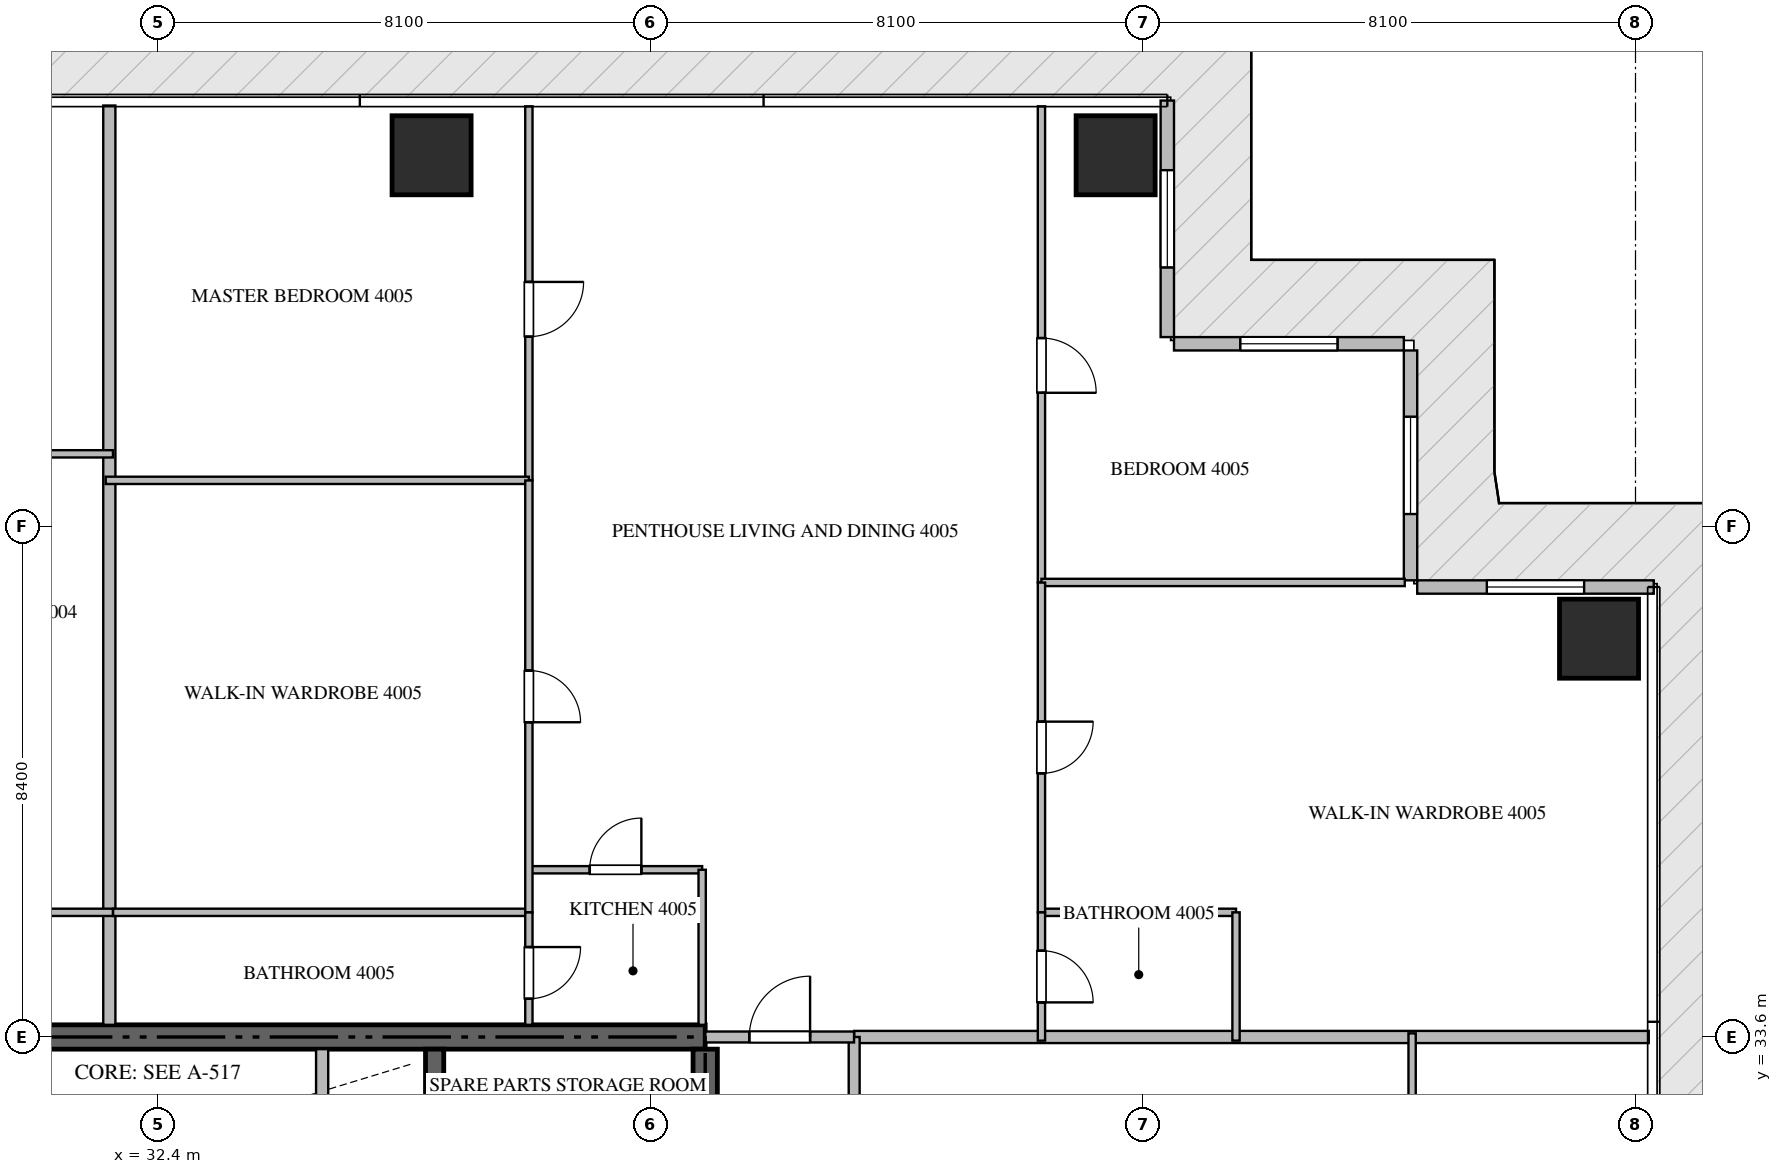
"""IFC4 building model, lengths in metres.
Left out: names, types, materials, properties, quantities, classifications, styles, units other than length and angle.
Written with IfcOpenShell. Run it as: python <this file> out.ifc"""

import sys

from ifc_helpers import new_model, si_unit, direction, frame, frame_2d, origin, origin_2d, place, context, subcontext, project, spatial, rectangle, extrude, source, transform, mapped, element, fill, save


model = new_model("IFC4")
c1 = context("Model", 3, precision=1e-05, world=origin(), true_north=direction((0.0, 1.0)))
c2 = subcontext(c1, "Body", "Model", "MODEL_VIEW")
j1 = project(units=[si_unit("LENGTHUNIT", "METRE"), si_unit("PLANEANGLEUNIT", "RADIAN")], contexts=[c1])
p1 = place(None, origin())
s1 = spatial("IfcSite", under=j1, at=p1, CompositionType="ELEMENT")
p2 = place(p1, origin())
s2 = spatial("IfcBuilding", under=s1, at=p2, CompositionType="ELEMENT")
p3 = place(p2, frame((0.0, 0.0, 161.4)))
s3 = spatial("IfcBuildingStorey", under=s2, at=p3, CompositionType="ELEMENT", Elevation=161.4)
p4 = place(p3, frame((41.4, 33.6, -0.26), z_axis=(0.0, 0.0, 1.0), x_axis=(-1.0, 0.0, 0.0)))
e1 = element("IfcWall", 1, at=p4, inside=s3, PredefinedType="SHEAR", context=c2, shape_type="SweptSolid", body=[
    extrude(rectangle(XDim=18.0, YDim=0.4, at=frame_2d((9.0, 0.0))), origin(), (0.0, 0.0, 1.0), 3.748),
])
p5 = place(p3, frame((41.4, 27.75, -0.26), z_axis=(0.0, 0.0, 1.0), x_axis=(0.0, 1.0, 0.0)))
e2 = element("IfcWall", 2, at=p5, inside=s3, PredefinedType="SHEAR", context=c2, shape_type="SweptSolid", body=[
    extrude(rectangle(XDim=5.65, YDim=0.4, at=frame_2d((2.825, 0.0))), origin(), (0.0, 0.0, 1.0), 3.748),
])
p6 = place(p3, frame((36.95, 27.05, -0.26), z_axis=(0.0, 0.0, 1.0), x_axis=(0.0, 1.0, 0.0)))
e3 = element("IfcWall", 3, at=p6, inside=s3, PredefinedType="SHEAR", context=c2, shape_type="SweptSolid", body=[
    extrude(rectangle(XDim=6.35, YDim=0.3, at=frame_2d((3.175, 0.0))), origin(), (0.0, 0.0, 1.0), 3.748),
])
m1 = source(origin(), c2, "Body", "SweptSolid", [
    extrude(rectangle(XDim=1.3, YDim=1.3, at=origin_2d()), origin(), (0.0, 0.0, 1.0), 3.75),
])
for number, where, z_axis, x_axis in (
    (4, (36.9, 48.1, -0.26), (0.0, 0.0, 1.0), (1.0, 0.0, 0.0)),
    (5, (48.15, 48.1, -0.26), (0.0, 0.0, 1.0), (1.0, 0.0, 0.0)),
    (6, (56.1, 40.15, -0.26), (0.0, 0.0, 1.0), (1.0, 0.0, 0.0)),
):
    element("IfcColumn", number, at=place(p3, frame(where, z_axis=z_axis, x_axis=x_axis)), inside=s3, PredefinedType="COLUMN", context=c2, shape_type="MappedRepresentation", body=[
        mapped(m1, transform((0.0, 0.0, 0.0), scale=1.0)),
    ])
p7 = place(p3, frame((57.0, 41.0, 0.0), z_axis=(0.0, 0.0, 1.0), x_axis=(-1.0, 0.0, 0.0)))
e7 = element("IfcWall", 7, at=p7, inside=s3, PredefinedType="ELEMENTEDWALL", context=c2, shape_type="SweptSolid", body=[
    extrude(rectangle(XDim=3.89, YDim=0.22, at=frame_2d((1.945, 0.0))), origin(), (0.0, 0.0, 1.0), 3.475),
])
p8 = place(p7, frame((1.145, 0.0, 0.65)))
e8 = element("IfcOpeningElement", 8, at=p8, cuts=e7, PredefinedType="OPENING", context=c2, shape_type="SweptSolid", body=[
    extrude(rectangle(XDim=1.6, YDim=2.1, at=frame_2d((0.8, 1.05))), frame((0.0, 0.12, 0.0), z_axis=(0.0, -1.0, 0.0), x_axis=(1.0, 0.0, 0.0)), (0.0, 0.0, 1.0), 0.24),
])
p9 = place(p3, frame((53.0, 41.11, 0.0), z_axis=(0.0, 0.0, 1.0), x_axis=(0.0, 1.0, 0.0)))
e9 = element("IfcWall", 9, at=p9, inside=s3, PredefinedType="ELEMENTEDWALL", context=c2, shape_type="SweptSolid", body=[
    extrude(rectangle(XDim=3.78, YDim=0.22, at=frame_2d((1.89, 0.0))), origin(), (0.0, 0.0, 1.0), 3.475),
])
p10 = place(p9, frame((1.09, 0.0, 0.65)))
e10 = element("IfcOpeningElement", 10, at=p10, cuts=e9, PredefinedType="OPENING", context=c2, shape_type="SweptSolid", body=[
    extrude(rectangle(XDim=1.6, YDim=2.1, at=frame_2d((0.8, 1.05))), frame((0.0, 0.12, 0.0), z_axis=(0.0, -1.0, 0.0), x_axis=(1.0, 0.0, 0.0)), (0.0, 0.0, 1.0), 0.24),
])
p11 = place(p3, frame((52.89, 45.0, 0.0), z_axis=(0.0, 0.0, 1.0), x_axis=(-1.0, 0.0, 0.0)))
e11 = element("IfcWall", 11, at=p11, inside=s3, PredefinedType="ELEMENTEDWALL", context=c2, shape_type="SweptSolid", body=[
    extrude(rectangle(XDim=3.78, YDim=0.22, at=frame_2d((1.89, 0.0))), origin(), (0.0, 0.0, 1.0), 3.475),
])
p12 = place(p11, frame((1.09, 0.0, 0.65)))
e12 = element("IfcOpeningElement", 12, at=p12, cuts=e11, PredefinedType="OPENING", context=c2, shape_type="SweptSolid", body=[
    extrude(rectangle(XDim=1.6, YDim=2.1, at=frame_2d((0.8, 1.05))), frame((0.0, 0.12, 0.0), z_axis=(0.0, -1.0, 0.0), x_axis=(1.0, 0.0, 0.0)), (0.0, 0.0, 1.0), 0.24),
])
p13 = place(p3, frame((49.0, 45.11, 0.0), z_axis=(0.0, 0.0, 1.0), x_axis=(0.0, 1.0, 0.0)))
e13 = element("IfcWall", 13, at=p13, inside=s3, PredefinedType="ELEMENTEDWALL", context=c2, shape_type="SweptSolid", body=[
    extrude(rectangle(XDim=3.89, YDim=0.22, at=frame_2d((1.945, 0.0))), origin(), (0.0, 0.0, 1.0), 3.475),
])
p14 = place(p13, frame((1.145, 0.0, 0.65)))
e14 = element("IfcOpeningElement", 14, at=p14, cuts=e13, PredefinedType="OPENING", context=c2, shape_type="SweptSolid", body=[
    extrude(rectangle(XDim=1.6, YDim=2.1, at=frame_2d((0.8, 1.05))), frame((0.0, 0.12, 0.0), z_axis=(0.0, -1.0, 0.0), x_axis=(1.0, 0.0, 0.0)), (0.0, 0.0, 1.0), 0.24),
])
p15 = place(p3, frame((35.1, 30.75, 0.0), z_axis=(0.0, 0.0, 1.0), x_axis=(0.0, 1.0, 0.0)))
e15 = element("IfcWall", 15, at=p15, inside=s3, PredefinedType="STANDARD", context=c2, shape_type="SweptSolid", body=[
    extrude(rectangle(XDim=2.65, YDim=0.2, at=frame_2d((1.325, 0.0))), origin(), (0.0, 0.0, 1.0), 3.49),
])
p16 = place(p3, frame((31.6, 33.8, 0.0), z_axis=(0.0, 0.0, 1.0), x_axis=(0.0, 1.0, 0.0)))
e16 = element("IfcWall", 16, at=p16, inside=s3, PredefinedType="PARTITIONING", context=c2, shape_type="SweptSolid", body=[
    extrude(rectangle(XDim=15.118, YDim=0.2, at=frame_2d((7.559, 0.0))), origin(), (0.0, 0.0, 1.0), 3.49),
])
p17 = place(p3, frame((43.85, 33.6, 0.0), z_axis=(0.0, 0.0, 1.0), x_axis=(1.0, 0.0, 0.0)))
e17 = element("IfcWall", 17, at=p17, inside=s3, PredefinedType="PARTITIONING", context=c2, shape_type="SweptSolid", body=[
    extrude(rectangle(XDim=13.068, YDim=0.2, at=frame_2d((6.534, 0.0))), origin(), (0.0, 0.0, 1.0), 3.49),
])
p18 = place(p3, frame((43.85, 14.9, 0.0), z_axis=(0.0, 0.0, 1.0), x_axis=(0.0, 1.0, 0.0)))
e18 = element("IfcWall", 18, at=p18, inside=s3, PredefinedType="PARTITIONING", context=c2, shape_type="SweptSolid", body=[
    extrude(rectangle(XDim=18.7, YDim=0.18, at=frame_2d((9.35, 0.0))), origin(), (0.0, 0.0, 1.0), 3.49),
])
p19 = place(p18, frame((1.805, 0.0, 0.0)))
e19 = element("IfcOpeningElement", 19, at=p19, cuts=e18, PredefinedType="OPENING", context=c2, shape_type="SweptSolid", body=[
    extrude(rectangle(XDim=1.0, YDim=2.15, at=frame_2d((0.5, 1.075))), frame((0.0, 0.1, 0.0), z_axis=(0.0, -1.0, 0.0), x_axis=(1.0, 0.0, 0.0)), (0.0, 0.0, 1.0), 0.2),
])
p20 = place(p3, frame((41.402, 33.6, 0.0), z_axis=(0.0, 0.0, 1.0), x_axis=(1.0, 0.0, 0.0)))
e20 = element("IfcWall", 20, at=p20, inside=s3, PredefinedType="PARTITIONING", context=c2, shape_type="SweptSolid", body=[
    extrude(rectangle(XDim=2.446, YDim=0.18, at=frame_2d((1.223, 0.0))), origin(), (0.0, 0.0, 1.0), 3.49),
])
p21 = place(p20, frame((0.723, 0.0, 0.0)))
e21 = element("IfcOpeningElement", 21, at=p21, cuts=e20, PredefinedType="OPENING", context=c2, shape_type="SweptSolid", body=[
    extrude(rectangle(XDim=1.0, YDim=2.15, at=frame_2d((0.5, 1.075))), frame((0.0, 0.1, 0.0), z_axis=(0.0, -1.0, 0.0), x_axis=(1.0, 0.0, 0.0)), (0.0, 0.0, 1.0), 0.2),
])
for number, where, z_axis, x_axis in (
    (22, (26.3, 43.19, 0.0), (0.0, 0.0, 1.0), (1.0, 0.0, 0.0)),
    (23, (26.3, 35.65, 0.0), (0.0, 0.0, 1.0), (1.0, 0.0, 0.0)),
):
    element("IfcWall", number, at=place(p3, frame(where, z_axis=z_axis, x_axis=x_axis)), inside=s3, PredefinedType="PARTITIONING", context=c2, shape_type="SweptSolid", body=[
        extrude(rectangle(XDim=5.36, YDim=0.12, at=frame_2d((2.68, 0.0))), origin(), (0.0, 0.0, 1.0), 3.49),
    ])
p22 = place(p3, frame((38.5, 36.35, 0.0), z_axis=(0.0, 0.0, 1.0), x_axis=(1.0, 0.0, 0.0)))
e24 = element("IfcWall", 24, at=p22, inside=s3, PredefinedType="PARTITIONING", context=c2, shape_type="SweptSolid", body=[
    extrude(rectangle(XDim=2.85, YDim=0.12, at=frame_2d((1.425, 0.0))), origin(), (0.0, 0.0, 1.0), 3.49),
])
p23 = place(p22, frame((1.0, 0.0, 0.0)))
e25 = element("IfcOpeningElement", 25, at=p23, cuts=e24, PredefinedType="OPENING", context=c2, shape_type="SweptSolid", body=[
    extrude(rectangle(XDim=0.85, YDim=2.1, at=frame_2d((0.425, 1.05))), frame((0.0, 0.07, 0.0), z_axis=(0.0, -1.0, 0.0), x_axis=(1.0, 0.0, 0.0)), (0.0, 0.0, 1.0), 0.14),
])
p24 = place(p3, frame((41.35, 36.35, 0.0), z_axis=(0.0, 0.0, 1.0), x_axis=(0.0, -1.0, 0.0)))
e26 = element("IfcWall", 26, at=p24, inside=s3, PredefinedType="PARTITIONING", context=c2, shape_type="SweptSolid", body=[
    extrude(rectangle(XDim=2.55, YDim=0.12, at=frame_2d((1.275, 0.0))), origin(), (0.0, 0.0, 1.0), 3.49),
])
p25 = place(p3, frame((38.5, 48.905, 0.0), z_axis=(0.0, 0.0, 1.0), x_axis=(0.0, -1.0, 0.0)))
e27 = element("IfcWall", 27, at=p25, inside=s3, PredefinedType="PARTITIONING", context=c2, shape_type="SweptSolid", body=[
    extrude(rectangle(XDim=6.151, YDim=0.12, at=frame_2d((3.076, 0.0))), origin(), (0.0, 0.0, 1.0), 3.49),
])
p26 = place(p25, frame((2.888, 0.0, 0.0)))
e28 = element("IfcOpeningElement", 28, at=p26, cuts=e27, PredefinedType="OPENING", context=c2, shape_type="SweptSolid", body=[
    extrude(rectangle(XDim=0.9, YDim=2.1, at=frame_2d((0.45, 1.05))), frame((0.0, 0.07, 0.0), z_axis=(0.0, -1.0, 0.0), x_axis=(1.0, 0.0, 0.0)), (0.0, 0.0, 1.0), 0.14),
])
p27 = place(p3, frame((31.54, 42.754, 0.0), z_axis=(0.0, 0.0, 1.0), x_axis=(1.0, 0.0, 0.0)))
e29 = element("IfcWall", 29, at=p27, inside=s3, PredefinedType="PARTITIONING", context=c2, shape_type="SweptSolid", body=[
    extrude(rectangle(XDim=6.96, YDim=0.12, at=frame_2d((3.48, 0.0))), origin(), (0.0, 0.0, 1.0), 3.49),
])
p28 = place(p3, frame((31.662, 35.65, 0.0), z_axis=(0.0, 0.0, 1.0), x_axis=(1.0, 0.0, 0.0)))
e30 = element("IfcWall", 30, at=p28, inside=s3, PredefinedType="PARTITIONING", context=c2, shape_type="SweptSolid", body=[
    extrude(rectangle(XDim=6.838, YDim=0.12, at=frame_2d((3.419, 0.0))), origin(), (0.0, 0.0, 1.0), 3.49),
])
p29 = place(p3, frame((38.5, 42.752, 0.0), z_axis=(0.0, 0.0, 1.0), x_axis=(0.0, -1.0, 0.0)))
e31 = element("IfcWall", 31, at=p29, inside=s3, PredefinedType="PARTITIONING", context=c2, shape_type="SweptSolid", body=[
    extrude(rectangle(XDim=7.102, YDim=0.12, at=frame_2d((3.551, 0.0))), origin(), (0.0, 0.0, 1.0), 3.49),
])
p30 = place(p29, frame((3.126, 0.0, 0.0)))
e32 = element("IfcOpeningElement", 32, at=p30, cuts=e31, PredefinedType="OPENING", context=c2, shape_type="SweptSolid", body=[
    extrude(rectangle(XDim=0.85, YDim=2.1, at=frame_2d((0.425, 1.05))), frame((0.0, 0.07, 0.0), z_axis=(0.0, -1.0, 0.0), x_axis=(1.0, 0.0, 0.0)), (0.0, 0.0, 1.0), 0.14),
])
p31 = place(p3, frame((38.5, 35.648, 0.0), z_axis=(0.0, 0.0, 1.0), x_axis=(0.0, -1.0, 0.0)))
e33 = element("IfcWall", 33, at=p31, inside=s3, PredefinedType="PARTITIONING", context=c2, shape_type="SweptSolid", body=[
    extrude(rectangle(XDim=1.848, YDim=0.12, at=frame_2d((0.924, 0.0))), origin(), (0.0, 0.0, 1.0), 3.49),
])
p32 = place(p31, frame((0.569, 0.0, 0.0)))
e34 = element("IfcOpeningElement", 34, at=p32, cuts=e33, PredefinedType="OPENING", context=c2, shape_type="SweptSolid", body=[
    extrude(rectangle(XDim=0.85, YDim=2.1, at=frame_2d((0.425, 1.05))), frame((0.0, 0.07, 0.0), z_axis=(0.0, -1.0, 0.0), x_axis=(1.0, 0.0, 0.0)), (0.0, 0.0, 1.0), 0.14),
])
p33 = place(p3, frame((46.93, 48.905, 0.0), z_axis=(0.0, 0.0, 1.0), x_axis=(0.0, -1.0, 0.0)))
e35 = element("IfcWall", 35, at=p33, inside=s3, PredefinedType="PARTITIONING", context=c2, shape_type="SweptSolid", body=[
    extrude(rectangle(XDim=7.83, YDim=0.12, at=frame_2d((3.915, 0.0))), origin(), (0.0, 0.0, 1.0), 3.49),
])
p34 = place(p33, frame((3.811, 0.0, 0.0)))
e36 = element("IfcOpeningElement", 36, at=p34, cuts=e35, PredefinedType="OPENING", context=c2, shape_type="SweptSolid", body=[
    extrude(rectangle(XDim=0.9, YDim=2.1, at=frame_2d((0.45, 1.05))), frame((0.0, 0.07, 0.0), z_axis=(0.0, -1.0, 0.0), x_axis=(1.0, 0.0, 0.0)), (0.0, 0.0, 1.0), 0.14),
])
p35 = place(p3, frame((46.93, 41.075, 0.0), z_axis=(0.0, 0.0, 1.0), x_axis=(1.0, 0.0, 0.0)))
e37 = element("IfcWall", 37, at=p35, inside=s3, PredefinedType="PARTITIONING", context=c2, shape_type="SweptSolid", body=[
    extrude(rectangle(XDim=5.975, YDim=0.12, at=frame_2d((2.988, 0.0))), origin(), (0.0, 0.0, 1.0), 3.49),
])
p36 = place(p3, frame((46.93, 35.65, 0.0), z_axis=(0.0, 0.0, 1.0), x_axis=(1.0, 0.0, 0.0)))
e38 = element("IfcWall", 38, at=p36, inside=s3, PredefinedType="PARTITIONING", context=c2, shape_type="SweptSolid", body=[
    extrude(rectangle(XDim=3.2, YDim=0.12, at=frame_2d((1.6, 0.0))), origin(), (0.0, 0.0, 1.0), 3.49),
])
p37 = place(p3, frame((50.13, 35.65, 0.0), z_axis=(0.0, 0.0, 1.0), x_axis=(0.0, -1.0, 0.0)))
e39 = element("IfcWall", 39, at=p37, inside=s3, PredefinedType="PARTITIONING", context=c2, shape_type="SweptSolid", body=[
    extrude(rectangle(XDim=2.11, YDim=0.12, at=frame_2d((1.055, 0.0))), origin(), (0.0, 0.0, 1.0), 3.49),
])
p38 = place(p3, frame((46.93, 41.073, 0.0), z_axis=(0.0, 0.0, 1.0), x_axis=(0.0, -1.0, 0.0)))
e40 = element("IfcWall", 40, at=p38, inside=s3, PredefinedType="PARTITIONING", context=c2, shape_type="SweptSolid", body=[
    extrude(rectangle(XDim=5.423, YDim=0.12, at=frame_2d((2.711, 0.0))), origin(), (0.0, 0.0, 1.0), 3.49),
])
p39 = place(p38, frame((2.287, 0.0, 0.0)))
e41 = element("IfcOpeningElement", 41, at=p39, cuts=e40, PredefinedType="OPENING", context=c2, shape_type="SweptSolid", body=[
    extrude(rectangle(XDim=0.85, YDim=2.1, at=frame_2d((0.425, 1.05))), frame((0.0, 0.07, 0.0), z_axis=(0.0, -1.0, 0.0), x_axis=(1.0, 0.0, 0.0)), (0.0, 0.0, 1.0), 0.14),
])
p40 = place(p3, frame((46.93, 35.648, 0.0), z_axis=(0.0, 0.0, 1.0), x_axis=(0.0, -1.0, 0.0)))
e42 = element("IfcWall", 42, at=p40, inside=s3, PredefinedType="PARTITIONING", context=c2, shape_type="SweptSolid", body=[
    extrude(rectangle(XDim=2.108, YDim=0.12, at=frame_2d((1.054, 0.0))), origin(), (0.0, 0.0, 1.0), 3.49),
])
p41 = place(p40, frame((0.629, 0.0, 0.0)))
e43 = element("IfcOpeningElement", 43, at=p41, cuts=e42, PredefinedType="OPENING", context=c2, shape_type="SweptSolid", body=[
    extrude(rectangle(XDim=0.85, YDim=2.1, at=frame_2d((0.425, 1.05))), frame((0.0, 0.07, 0.0), z_axis=(0.0, -1.0, 0.0), x_axis=(1.0, 0.0, 0.0)), (0.0, 0.0, 1.0), 0.14),
])
p42 = place(p3, frame((53.026, 22.6, 0.0), z_axis=(0.0, 0.0, 1.0), x_axis=(0.0, 1.0, 0.0)))
e44 = element("IfcWall", 44, at=p42, inside=s3, PredefinedType="PARTITIONING", context=c2, shape_type="SweptSolid", body=[
    extrude(rectangle(XDim=11.06, YDim=0.12, at=frame_2d((5.53, 0.0))), origin(), (0.0, 0.0, 1.0), 3.49),
])
m2 = source(origin(), c2, "Body", "SweptSolid", [
    extrude(rectangle(XDim=1.6, YDim=2.1, at=frame_2d((0.8, 1.05))), frame((0.0, 0.03, 0.0), z_axis=(0.0, -1.0, 0.0), x_axis=(1.0, 0.0, 0.0)), (0.0, 0.0, 1.0), 0.06),
])
p43 = place(p8, origin())
e45 = element("IfcWindow", 45, at=p43, inside=s3, PartitioningType="SINGLE_PANEL", PredefinedType="WINDOW", context=c2, shape_type="MappedRepresentation", body=[
    mapped(m2, transform((0.0, 0.0, 0.0), scale=1.0)),
])
fill(e8, e45)
p44 = place(p10, origin())
e46 = element("IfcWindow", 46, at=p44, inside=s3, PartitioningType="SINGLE_PANEL", PredefinedType="WINDOW", context=c2, shape_type="MappedRepresentation", body=[
    mapped(m2, transform((0.0, 0.0, 0.0), scale=1.0)),
])
fill(e10, e46)
p45 = place(p12, origin())
e47 = element("IfcWindow", 47, at=p45, inside=s3, PartitioningType="SINGLE_PANEL", PredefinedType="WINDOW", context=c2, shape_type="MappedRepresentation", body=[
    mapped(m2, transform((0.0, 0.0, 0.0), scale=1.0)),
])
fill(e12, e47)
p46 = place(p14, origin())
e48 = element("IfcWindow", 48, at=p46, inside=s3, PartitioningType="SINGLE_PANEL", PredefinedType="WINDOW", context=c2, shape_type="MappedRepresentation", body=[
    mapped(m2, transform((0.0, 0.0, 0.0), scale=1.0)),
])
fill(e14, e48)
m3 = source(origin(), c2, "Body", "SweptSolid", [
    extrude(rectangle(XDim=1.0, YDim=2.15, at=frame_2d((0.5, 1.075))), frame((0.0, 0.025, 0.0), z_axis=(0.0, -1.0, 0.0), x_axis=(1.0, 0.0, 0.0)), (0.0, 0.0, 1.0), 0.05),
])
p47 = place(p21, origin())
e49 = element("IfcDoor", 49, at=p47, inside=s3, OperationType="SINGLE_SWING_RIGHT", PredefinedType="DOOR", context=c2, shape_type="MappedRepresentation", body=[
    mapped(m3, transform((0.0, 0.0, 0.0), scale=1.0)),
])
fill(e21, e49)
m4 = source(origin(), c2, "Body", "SweptSolid", [
    extrude(rectangle(XDim=0.85, YDim=2.1, at=frame_2d((0.425, 1.05))), frame((0.0, 0.025, 0.0), z_axis=(0.0, -1.0, 0.0), x_axis=(1.0, 0.0, 0.0)), (0.0, 0.0, 1.0), 0.05),
])
p48 = place(p23, origin())
e50 = element("IfcDoor", 50, at=p48, inside=s3, OperationType="SINGLE_SWING_RIGHT", PredefinedType="DOOR", context=c2, shape_type="MappedRepresentation", body=[
    mapped(m4, transform((0.0, 0.0, 0.0), scale=1.0)),
])
fill(e25, e50)
m5 = source(origin(), c2, "Body", "SweptSolid", [
    extrude(rectangle(XDim=0.9, YDim=2.1, at=frame_2d((0.45, 1.05))), frame((0.0, 0.025, 0.0), z_axis=(0.0, -1.0, 0.0), x_axis=(1.0, 0.0, 0.0)), (0.0, 0.0, 1.0), 0.05),
])
p49 = place(p26, origin())
e51 = element("IfcDoor", 51, at=p49, inside=s3, OperationType="SINGLE_SWING_LEFT", PredefinedType="DOOR", context=c2, shape_type="MappedRepresentation", body=[
    mapped(m5, transform((0.0, 0.0, 0.0), scale=1.0)),
])
fill(e28, e51)
p50 = place(p30, origin())
e52 = element("IfcDoor", 52, at=p50, inside=s3, OperationType="SINGLE_SWING_RIGHT", PredefinedType="DOOR", context=c2, shape_type="MappedRepresentation", body=[
    mapped(m4, transform((0.0, 0.0, 0.0), scale=1.0)),
])
fill(e32, e52)
p51 = place(p32, origin())
e53 = element("IfcDoor", 53, at=p51, inside=s3, OperationType="SINGLE_SWING_LEFT", PredefinedType="DOOR", context=c2, shape_type="MappedRepresentation", body=[
    mapped(m4, transform((0.0, 0.0, 0.0), scale=1.0)),
])
fill(e34, e53)
p52 = place(p34, origin())
e54 = element("IfcDoor", 54, at=p52, inside=s3, OperationType="SINGLE_SWING_RIGHT", PredefinedType="DOOR", context=c2, shape_type="MappedRepresentation", body=[
    mapped(m5, transform((0.0, 0.0, 0.0), scale=1.0)),
])
fill(e36, e54)
p53 = place(p39, origin())
e55 = element("IfcDoor", 55, at=p53, inside=s3, OperationType="SINGLE_SWING_LEFT", PredefinedType="DOOR", context=c2, shape_type="MappedRepresentation", body=[
    mapped(m4, transform((0.0, 0.0, 0.0), scale=1.0)),
])
fill(e41, e55)
p54 = place(p41, origin())
e56 = element("IfcDoor", 56, at=p54, inside=s3, OperationType="SINGLE_SWING_RIGHT", PredefinedType="DOOR", context=c2, shape_type="MappedRepresentation", body=[
    mapped(m4, transform((0.0, 0.0, 0.0), scale=1.0)),
])
fill(e43, e56)
save(model, sys.argv[1])
